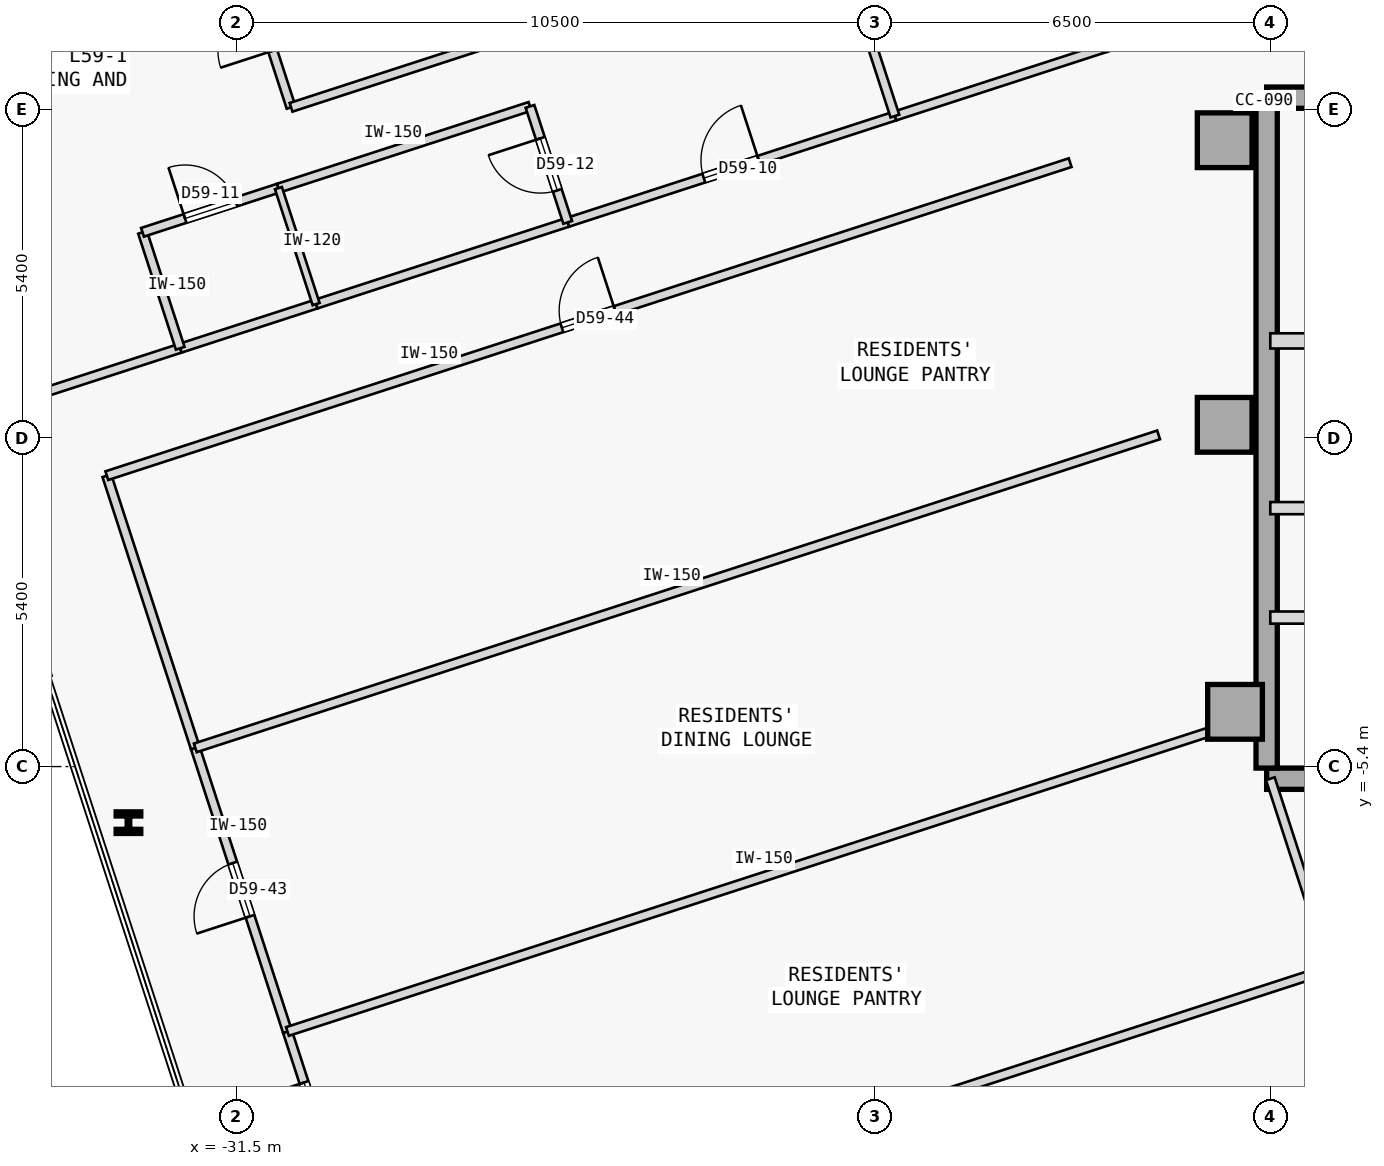
"""IFC4 building model, lengths in metres.
Left out: names, types, materials, properties, quantities, classifications, styles, units other than length and angle.
Written with IfcOpenShell. Run it as: python <this file> out.ifc"""

import sys

from ifc_helpers import new_model, si_unit, direction, frame, frame_2d, origin, origin_2d, place, context, subcontext, project, spatial, rectangle, i_section, extrude, element, fill, save


model = new_model("IFC4")
c1 = context("Model", 3, precision=1e-05, world=origin(), true_north=direction((0.0, 1.0)))
c2 = subcontext(c1, "Body", "Model", "MODEL_VIEW")
j1 = project(units=[si_unit("LENGTHUNIT", "METRE"), si_unit("PLANEANGLEUNIT", "RADIAN")], contexts=[c1])
p1 = place(None, origin())
s1 = spatial("IfcSite", under=j1, at=p1, CompositionType="ELEMENT")
p2 = place(p1, origin())
s2 = spatial("IfcBuilding", under=s1, at=p2, CompositionType="ELEMENT")
p3 = place(p2, frame((0.0, 0.0, 224.3)))
s3 = spatial("IfcBuildingStorey", under=s2, at=p3, CompositionType="ELEMENT", Elevation=224.3)
for number, where, z_axis, x_axis in (
    (1, (-15.25, 4.9, 0.0), (0.0, 0.0, 1.0), (1.0, 0.0, 0.0)),
    (2, (-15.25, 0.22, 0.0), (0.0, 0.0, 1.0), (1.0, 0.0, 0.0)),
    (3, (-15.08, -4.5, 0.0), (0.0, 0.0, 1.0), (1.0, 0.0, 0.0)),
):
    element("IfcColumn", number, at=place(p3, frame(where, z_axis=z_axis, x_axis=x_axis)), inside=s3, PredefinedType="COLUMN", context=c2, shape_type="SweptSolid", body=[
        extrude(rectangle(XDim=0.9, YDim=0.9, at=origin_2d()), origin(), (0.0, 0.0, 1.0), 3.35),
    ])
p4 = place(p3, frame((-14.56, 5.6, 0.0), z_axis=(0.0, 0.0, 1.0), x_axis=(1.0, 0.0, 0.0)))
e4 = element("IfcWall", 4, at=p4, inside=s3, PredefinedType="SHEAR", context=c2, shape_type="SweptSolid", body=[
    extrude(rectangle(XDim=11.41, YDim=0.35, at=frame_2d((5.705, 0.0))), origin(), (0.0, 0.0, 1.0), 3.125),
])
p5 = place(p3, frame((-14.56, -5.6, 0.0), z_axis=(0.0, 0.0, 1.0), x_axis=(1.0, 0.0, 0.0)))
e5 = element("IfcWall", 5, at=p5, inside=s3, PredefinedType="SHEAR", context=c2, shape_type="SweptSolid", body=[
    extrude(rectangle(XDim=10.86, YDim=0.35, at=frame_2d((5.43, 0.0))), origin(), (0.0, 0.0, 1.0), 3.125),
])
p6 = place(p3, frame((-14.56, -5.425, 0.0), z_axis=(0.0, 0.0, 1.0), x_axis=(0.0, 1.0, 0.0)))
e6 = element("IfcWall", 6, at=p6, inside=s3, PredefinedType="SHEAR", context=c2, shape_type="SweptSolid", body=[
    extrude(rectangle(XDim=10.85, YDim=0.35, at=frame_2d((5.425, 0.0))), origin(), (0.0, 0.0, 1.0), 3.125),
])
p7 = place(p3, frame((-33.278, -6.322, 0.0), z_axis=(0.0, 0.0, 1.0), x_axis=(1.0, 0.0, 0.0)))
e7 = element("IfcColumn", 7, at=p7, inside=s3, PredefinedType="COLUMN", context=c2, shape_type="SweptSolid", body=[
    extrude(i_section(OverallWidth=0.405, OverallDepth=0.355, WebThickness=0.042, FlangeThickness=0.068, FilletRadius=0.015, at=origin_2d()), origin(), (0.0, 0.0, 1.0), 3.35),
])
p8 = place(p3, frame((-14.5, 1.6, 0.0), z_axis=(0.0, 0.0, 1.0), x_axis=(1.0, 0.0, 0.0)))
e8 = element("IfcWall", 8, at=p8, inside=s3, PredefinedType="STANDARD", context=c2, shape_type="SweptSolid", body=[
    extrude(rectangle(XDim=3.6, YDim=0.25, at=frame_2d((1.8, 0.0))), origin(), (0.0, 0.0, 1.0), 3.125),
])
p9 = place(p8, frame((0.92, 0.0, 0.0)))
e9 = element("IfcOpeningElement", 9, at=p9, cuts=e8, PredefinedType="OPENING", context=c2, shape_type="SweptSolid", body=[
    extrude(rectangle(XDim=1.05, YDim=2.15, at=frame_2d((0.525, 1.075))), frame((0.0, 0.135, 0.0), z_axis=(0.0, -1.0, 0.0), x_axis=(1.0, 0.0, 0.0)), (0.0, 0.0, 1.0), 0.27),
])
p10 = place(p3, frame((-14.5, -1.15, 0.0), z_axis=(0.0, 0.0, 1.0), x_axis=(1.0, 0.0, 0.0)))
e10 = element("IfcWall", 10, at=p10, inside=s3, PredefinedType="STANDARD", context=c2, shape_type="SweptSolid", body=[
    extrude(rectangle(XDim=2.95, YDim=0.2, at=frame_2d((1.475, 0.0))), origin(), (0.0, 0.0, 1.0), 3.125),
])
p11 = place(p10, frame((0.75, 0.0, 0.0)))
e11 = element("IfcOpeningElement", 11, at=p11, cuts=e10, PredefinedType="OPENING", context=c2, shape_type="SweptSolid", body=[
    extrude(rectangle(XDim=1.05, YDim=2.18, at=frame_2d((0.525, 1.09))), frame((0.0, 0.11, 0.0), z_axis=(0.0, -1.0, 0.0), x_axis=(1.0, 0.0, 0.0)), (0.0, 0.0, 1.0), 0.22),
])
p12 = place(p3, frame((-14.5, -2.95, 0.0), z_axis=(0.0, 0.0, 1.0), x_axis=(1.0, 0.0, 0.0)))
e12 = element("IfcWall", 12, at=p12, inside=s3, PredefinedType="STANDARD", context=c2, shape_type="SweptSolid", body=[
    extrude(rectangle(XDim=10.8, YDim=0.2, at=frame_2d((5.4, 0.0))), origin(), (0.0, 0.0, 1.0), 3.125),
])
p13 = place(p12, frame((9.17, 0.0, 0.0)))
e13 = element("IfcOpeningElement", 13, at=p13, cuts=e12, PredefinedType="OPENING", context=c2, shape_type="SweptSolid", body=[
    extrude(rectangle(XDim=1.1, YDim=2.15, at=frame_2d((0.55, 1.075))), frame((0.0, 0.11, 0.0), z_axis=(0.0, -1.0, 0.0), x_axis=(1.0, 0.0, 0.0)), (0.0, 0.0, 1.0), 0.22),
])
p14 = place(p12, frame((3.86, 0.0, 0.0)))
e14 = element("IfcOpeningElement", 14, at=p14, cuts=e12, PredefinedType="OPENING", context=c2, shape_type="SweptSolid", body=[
    extrude(rectangle(XDim=0.92, YDim=2.15, at=frame_2d((0.46, 1.075))), frame((0.0, 0.11, 0.0), z_axis=(0.0, -1.0, 0.0), x_axis=(1.0, 0.0, 0.0)), (0.0, 0.0, 1.0), 0.22),
])
p15 = place(p3, frame((-36.012, 0.314, 0.0), z_axis=(0.0, 0.0, 1.0), x_axis=(0.951071182868, 0.308971851659, 0.0)))
e15 = element("IfcWall", 15, at=p15, inside=s3, PredefinedType="PARTITIONING", context=c2, shape_type="SweptSolid", body=[
    extrude(rectangle(XDim=3.77, YDim=0.15, at=frame_2d((1.885, 0.0))), origin(), (0.0, 0.0, 1.0), 3.125),
])
p16 = place(p3, frame((-26.055, 3.55, 0.0), z_axis=(0.0, 0.0, 1.0), x_axis=(0.951063554534, 0.308995332064, 0.0)))
e16 = element("IfcWall", 16, at=p16, inside=s3, PredefinedType="PARTITIONING", context=c2, shape_type="SweptSolid", body=[
    extrude(rectangle(XDim=5.658, YDim=0.15, at=frame_2d((2.829, 0.0))), origin(), (0.0, 0.0, 1.0), 3.125),
])
p17 = place(p16, frame((2.354, 0.0, 0.0)))
e17 = element("IfcOpeningElement", 17, at=p17, cuts=e16, PredefinedType="OPENING", context=c2, shape_type="SweptSolid", body=[
    extrude(rectangle(XDim=0.95, YDim=2.15, at=frame_2d((0.475, 1.075))), frame((0.0, 0.085, 0.0), z_axis=(0.0, -1.0, 0.0), x_axis=(1.0, 0.0, 0.0)), (0.0, 0.0, 1.0), 0.17),
])
p18 = place(p3, frame((-32.427, 1.479, 0.0), z_axis=(0.0, 0.0, 1.0), x_axis=(0.951045519245, 0.309050837767, 0.0)))
e18 = element("IfcWall", 18, at=p18, inside=s3, PredefinedType="PARTITIONING", context=c2, shape_type="SweptSolid", body=[
    extrude(rectangle(XDim=2.35, YDim=0.15, at=frame_2d((1.175, 0.0))), origin(), (0.0, 0.0, 1.0), 3.125),
])
p19 = place(p3, frame((-30.192, 2.205, 0.0), z_axis=(0.0, 0.0, 1.0), x_axis=(0.951052627573, 0.309028962374, 0.0)))
e19 = element("IfcWall", 19, at=p19, inside=s3, PredefinedType="PARTITIONING", context=c2, shape_type="SweptSolid", body=[
    extrude(rectangle(XDim=4.35, YDim=0.15, at=frame_2d((2.175, 0.0))), origin(), (0.0, 0.0, 1.0), 3.125),
])
p20 = place(p3, frame((-20.674, 5.298, 0.0), z_axis=(0.0, 0.0, 1.0), x_axis=(0.951057168147, 0.309014988174, 0.0)))
e20 = element("IfcWall", 20, at=p20, inside=s3, PredefinedType="PARTITIONING", context=c2, shape_type="SweptSolid", body=[
    extrude(rectangle(XDim=3.65, YDim=0.15, at=frame_2d((1.825, 0.0))), origin(), (0.0, 0.0, 1.0), 3.125),
])
p21 = place(p3, frame((-29.833, -12.311, 0.0), z_axis=(0.0, 0.0, 1.0), x_axis=(-0.309044953986, 0.951047431213, 0.0)))
e21 = element("IfcWall", 21, at=p21, inside=s3, PredefinedType="PARTITIONING", context=c2, shape_type="SweptSolid", body=[
    extrude(rectangle(XDim=2.685, YDim=0.15, at=frame_2d((1.343, 0.0))), origin(), (0.0, 0.0, 1.0), 3.125),
])
p22 = place(p21, frame((0.883, 0.0, 0.0)))
e22 = element("IfcOpeningElement", 22, at=p22, cuts=e21, PredefinedType="OPENING", context=c2, shape_type="SweptSolid", body=[
    extrude(rectangle(XDim=0.92, YDim=2.15, at=frame_2d((0.46, 1.075))), frame((0.0, 0.085, 0.0), z_axis=(0.0, -1.0, 0.0), x_axis=(1.0, 0.0, 0.0)), (0.0, 0.0, 1.0), 0.17),
])
p23 = place(p3, frame((-30.663, -9.757, 0.0), z_axis=(0.0, 0.0, 1.0), x_axis=(-0.309019653166, 0.951055652397, 0.0)))
e23 = element("IfcWall", 23, at=p23, inside=s3, PredefinedType="PARTITIONING", context=c2, shape_type="SweptSolid", body=[
    extrude(rectangle(XDim=4.904, YDim=0.15, at=frame_2d((2.452, 0.0))), origin(), (0.0, 0.0, 1.0), 3.125),
])
p24 = place(p23, frame((1.992, 0.0, 0.0)))
e24 = element("IfcOpeningElement", 24, at=p24, cuts=e23, PredefinedType="OPENING", context=c2, shape_type="SweptSolid", body=[
    extrude(rectangle(XDim=0.92, YDim=2.15, at=frame_2d((0.46, 1.075))), frame((0.0, 0.085, 0.0), z_axis=(0.0, -1.0, 0.0), x_axis=(1.0, 0.0, 0.0)), (0.0, 0.0, 1.0), 0.17),
])
p25 = place(p3, frame((-32.179, -5.093, 0.0), z_axis=(0.0, 0.0, 1.0), x_axis=(-0.309014532869, 0.951057316083, 0.0)))
e25 = element("IfcWall", 25, at=p25, inside=s3, PredefinedType="PARTITIONING", context=c2, shape_type="SweptSolid", body=[
    extrude(rectangle(XDim=4.707, YDim=0.15, at=frame_2d((2.354, 0.0))), origin(), (0.0, 0.0, 1.0), 3.125),
])
p26 = place(p3, frame((-33.633, -0.616, 0.0), z_axis=(0.0, 0.0, 1.0), x_axis=(0.951058192995, 0.309011833974, 0.0)))
e26 = element("IfcWall", 26, at=p26, inside=s3, PredefinedType="PARTITIONING", context=c2, shape_type="SweptSolid", body=[
    extrude(rectangle(XDim=16.657, YDim=0.15, at=frame_2d((8.329, 0.0))), origin(), (0.0, 0.0, 1.0), 3.125),
])
p27 = place(p26, frame((7.868, 0.0, 0.0)))
e27 = element("IfcOpeningElement", 27, at=p27, cuts=e26, PredefinedType="OPENING", context=c2, shape_type="SweptSolid", body=[
    extrude(rectangle(XDim=0.92, YDim=2.15, at=frame_2d((0.46, 1.075))), frame((0.0, 0.085, 0.0), z_axis=(0.0, -1.0, 0.0), x_axis=(1.0, 0.0, 0.0)), (0.0, 0.0, 1.0), 0.17),
])
p28 = place(p3, frame((-32.427, 1.479, 0.0), z_axis=(0.0, 0.0, 1.0), x_axis=(-0.309022749039, 0.951054646472, 0.0)))
e28 = element("IfcWall", 28, at=p28, inside=s3, PredefinedType="PARTITIONING", context=c2, shape_type="SweptSolid", body=[
    extrude(rectangle(XDim=2.005, YDim=0.15, at=frame_2d((1.002, 0.0))), origin(), (0.0, 0.0, 1.0), 3.125),
])
p29 = place(p3, frame((-33.046, 3.386, 0.0), z_axis=(0.0, 0.0, 1.0), x_axis=(0.951045519245, 0.309050837767, 0.0)))
e29 = element("IfcWall", 29, at=p29, inside=s3, PredefinedType="PARTITIONING", context=c2, shape_type="SweptSolid", body=[
    extrude(rectangle(XDim=2.35, YDim=0.15, at=frame_2d((1.175, 0.0))), origin(), (0.0, 0.0, 1.0), 3.125),
])
p30 = place(p29, frame((0.735, 0.0, 0.0)))
e30 = element("IfcOpeningElement", 30, at=p30, cuts=e29, PredefinedType="OPENING", context=c2, shape_type="SweptSolid", body=[
    extrude(rectangle(XDim=0.88, YDim=2.15, at=frame_2d((0.44, 1.075))), frame((0.0, 0.085, 0.0), z_axis=(0.0, -1.0, 0.0), x_axis=(1.0, 0.0, 0.0)), (0.0, 0.0, 1.0), 0.17),
])
p31 = place(p3, frame((-30.811, 4.112, 0.0), z_axis=(0.0, 0.0, 1.0), x_axis=(0.951069122051, 0.308978195154, 0.0)))
e31 = element("IfcWall", 31, at=p31, inside=s3, PredefinedType="PARTITIONING", context=c2, shape_type="SweptSolid", body=[
    extrude(rectangle(XDim=4.35, YDim=0.15, at=frame_2d((2.175, 0.0))), origin(), (0.0, 0.0, 1.0), 3.125),
])
p32 = place(p3, frame((-26.055, 3.55, 0.0), z_axis=(0.0, 0.0, 1.0), x_axis=(-0.309058537449, 0.951043017129, 0.0)))
e32 = element("IfcWall", 32, at=p32, inside=s3, PredefinedType="PARTITIONING", context=c2, shape_type="SweptSolid", body=[
    extrude(rectangle(XDim=2.005, YDim=0.15, at=frame_2d((1.002, 0.0))), origin(), (0.0, 0.0, 1.0), 3.125),
])
p33 = place(p32, frame((0.552, 0.0, 0.0)))
e33 = element("IfcOpeningElement", 33, at=p33, cuts=e32, PredefinedType="OPENING", context=c2, shape_type="SweptSolid", body=[
    extrude(rectangle(XDim=0.9, YDim=2.15, at=frame_2d((0.45, 1.075))), frame((0.0, 0.085, 0.0), z_axis=(0.0, -1.0, 0.0), x_axis=(1.0, 0.0, 0.0)), (0.0, 0.0, 1.0), 0.17),
])
p34 = place(p3, frame((-30.604, 5.441, 0.0), z_axis=(0.0, 0.0, 1.0), x_axis=(-0.309018403393, 0.951056058476, 0.0)))
e34 = element("IfcWall", 34, at=p34, inside=s3, PredefinedType="PARTITIONING", context=c2, shape_type="SweptSolid", body=[
    extrude(rectangle(XDim=4.079, YDim=0.15, at=frame_2d((2.04, 0.0))), origin(), (0.0, 0.0, 1.0), 3.125),
])
p35 = place(p34, frame((0.978, 0.0, 0.0)))
e35 = element("IfcOpeningElement", 35, at=p35, cuts=e34, PredefinedType="OPENING", context=c2, shape_type="SweptSolid", body=[
    extrude(rectangle(XDim=0.9, YDim=2.15, at=frame_2d((0.45, 1.075))), frame((0.0, 0.085, 0.0), z_axis=(0.0, -1.0, 0.0), x_axis=(1.0, 0.0, 0.0)), (0.0, 0.0, 1.0), 0.17),
])
p36 = place(p3, frame((-30.604, 5.441, 0.0), z_axis=(0.0, 0.0, 1.0), x_axis=(0.951070715387, 0.308973290646, 0.0)))
e36 = element("IfcWall", 36, at=p36, inside=s3, PredefinedType="PARTITIONING", context=c2, shape_type="SweptSolid", body=[
    extrude(rectangle(XDim=4.65, YDim=0.15, at=frame_2d((2.325, 0.0))), origin(), (0.0, 0.0, 1.0), 3.125),
])
p37 = place(p3, frame((-20.674, 5.298, 0.0), z_axis=(0.0, 0.0, 1.0), x_axis=(-0.309029230739, 0.951052540372, 0.0)))
e37 = element("IfcWall", 37, at=p37, inside=s3, PredefinedType="PARTITIONING", context=c2, shape_type="SweptSolid", body=[
    extrude(rectangle(XDim=7.284, YDim=0.15, at=frame_2d((3.642, 0.0))), origin(), (0.0, 0.0, 1.0), 3.125),
])
p38 = place(p3, frame((-30.192, 2.205, 0.0), z_axis=(0.0, 0.0, 1.0), x_axis=(-0.309022749039, 0.951054646472, 0.0)))
e38 = element("IfcWall", 38, at=p38, inside=s3, PredefinedType="PARTITIONING", context=c2, shape_type="SweptSolid", body=[
    extrude(rectangle(XDim=2.005, YDim=0.12, at=frame_2d((1.002, 0.0))), origin(), (0.0, 0.0, 1.0), 3.125),
])
p39 = place(p3, frame((-31.208, -14.471, 0.0), z_axis=(0.0, 0.0, 1.0), x_axis=(0.951057753948, 0.309013185244, 0.0)))
e39 = element("IfcWall", 39, at=p39, inside=s3, PredefinedType="PARTITIONING", context=c2, shape_type="SweptSolid", body=[
    extrude(rectangle(XDim=18.632, YDim=0.15, at=frame_2d((9.316, 0.0))), origin(), (0.0, 0.0, 1.0), 3.125),
])
p40 = place(p3, frame((-30.663, -9.757, 0.0), z_axis=(0.0, 0.0, 1.0), x_axis=(0.951058192995, 0.309011833974, 0.0)))
e40 = element("IfcWall", 40, at=p40, inside=s3, PredefinedType="PARTITIONING", context=c2, shape_type="SweptSolid", body=[
    extrude(rectangle(XDim=16.657, YDim=0.15, at=frame_2d((8.329, 0.0))), origin(), (0.0, 0.0, 1.0), 3.125),
])
p41 = place(p3, frame((-13.488, -8.713, 0.0), z_axis=(0.0, 0.0, 1.0), x_axis=(-0.309082700143, 0.951035164687, 0.0)))
e41 = element("IfcWall", 41, at=p41, inside=s3, PredefinedType="PARTITIONING", context=c2, shape_type="SweptSolid", body=[
    extrude(rectangle(XDim=3.274, YDim=0.15, at=frame_2d((1.637, 0.0))), origin(), (0.0, 0.0, 1.0), 3.125),
])
p42 = place(p3, frame((-32.179, -5.093, 0.0), z_axis=(0.0, 0.0, 1.0), x_axis=(0.951053885426, 0.309025091239, 0.0)))
e42 = element("IfcWall", 42, at=p42, inside=s3, PredefinedType="PARTITIONING", context=c2, shape_type="SweptSolid", body=[
    extrude(rectangle(XDim=16.657, YDim=0.15, at=frame_2d((8.329, 0.0))), origin(), (0.0, 0.0, 1.0), 3.125),
])
p43 = place(p17, origin())
e43 = element("IfcDoor", 43, at=p43, inside=s3, OperationType="SINGLE_SWING_RIGHT", PredefinedType="DOOR", context=c2, shape_type="SweptSolid", body=[
    extrude(rectangle(XDim=0.95, YDim=2.15, at=frame_2d((0.475, 1.075))), frame((0.0, 0.025, 0.0), z_axis=(0.0, -1.0, 0.0), x_axis=(1.0, 0.0, 0.0)), (0.0, 0.0, 1.0), 0.05),
])
fill(e17, e43)
p44 = place(p30, origin())
e44 = element("IfcDoor", 44, at=p44, inside=s3, OperationType="SINGLE_SWING_LEFT", PredefinedType="DOOR", context=c2, shape_type="SweptSolid", body=[
    extrude(rectangle(XDim=0.88, YDim=2.15, at=frame_2d((0.44, 1.075))), frame((0.0, 0.025, 0.0), z_axis=(0.0, -1.0, 0.0), x_axis=(1.0, 0.0, 0.0)), (0.0, 0.0, 1.0), 0.05),
])
fill(e30, e44)
p45 = place(p33, origin())
e45 = element("IfcDoor", 45, at=p45, inside=s3, OperationType="SINGLE_SWING_RIGHT", PredefinedType="DOOR", context=c2, shape_type="SweptSolid", body=[
    extrude(rectangle(XDim=0.9, YDim=2.15, at=frame_2d((0.45, 1.075))), frame((0.0, 0.025, 0.0), z_axis=(0.0, -1.0, 0.0), x_axis=(1.0, 0.0, 0.0)), (0.0, 0.0, 1.0), 0.05),
])
fill(e33, e45)
p46 = place(p22, origin())
e46 = element("IfcDoor", 46, at=p46, inside=s3, OperationType="SINGLE_SWING_RIGHT", PredefinedType="DOOR", context=c2, shape_type="SweptSolid", body=[
    extrude(rectangle(XDim=0.92, YDim=2.15, at=frame_2d((0.46, 1.075))), frame((0.0, 0.025, 0.0), z_axis=(0.0, -1.0, 0.0), x_axis=(1.0, 0.0, 0.0)), (0.0, 0.0, 1.0), 0.05),
])
fill(e22, e46)
p47 = place(p24, origin())
e47 = element("IfcDoor", 47, at=p47, inside=s3, OperationType="SINGLE_SWING_LEFT", PredefinedType="DOOR", context=c2, shape_type="SweptSolid", body=[
    extrude(rectangle(XDim=0.92, YDim=2.15, at=frame_2d((0.46, 1.075))), frame((0.0, 0.025, 0.0), z_axis=(0.0, -1.0, 0.0), x_axis=(1.0, 0.0, 0.0)), (0.0, 0.0, 1.0), 0.05),
])
fill(e24, e47)
p48 = place(p27, origin())
e48 = element("IfcDoor", 48, at=p48, inside=s3, OperationType="SINGLE_SWING_RIGHT", PredefinedType="DOOR", context=c2, shape_type="SweptSolid", body=[
    extrude(rectangle(XDim=0.92, YDim=2.15, at=frame_2d((0.46, 1.075))), frame((0.0, 0.025, 0.0), z_axis=(0.0, -1.0, 0.0), x_axis=(1.0, 0.0, 0.0)), (0.0, 0.0, 1.0), 0.05),
])
fill(e27, e48)
save(model, sys.argv[1])
